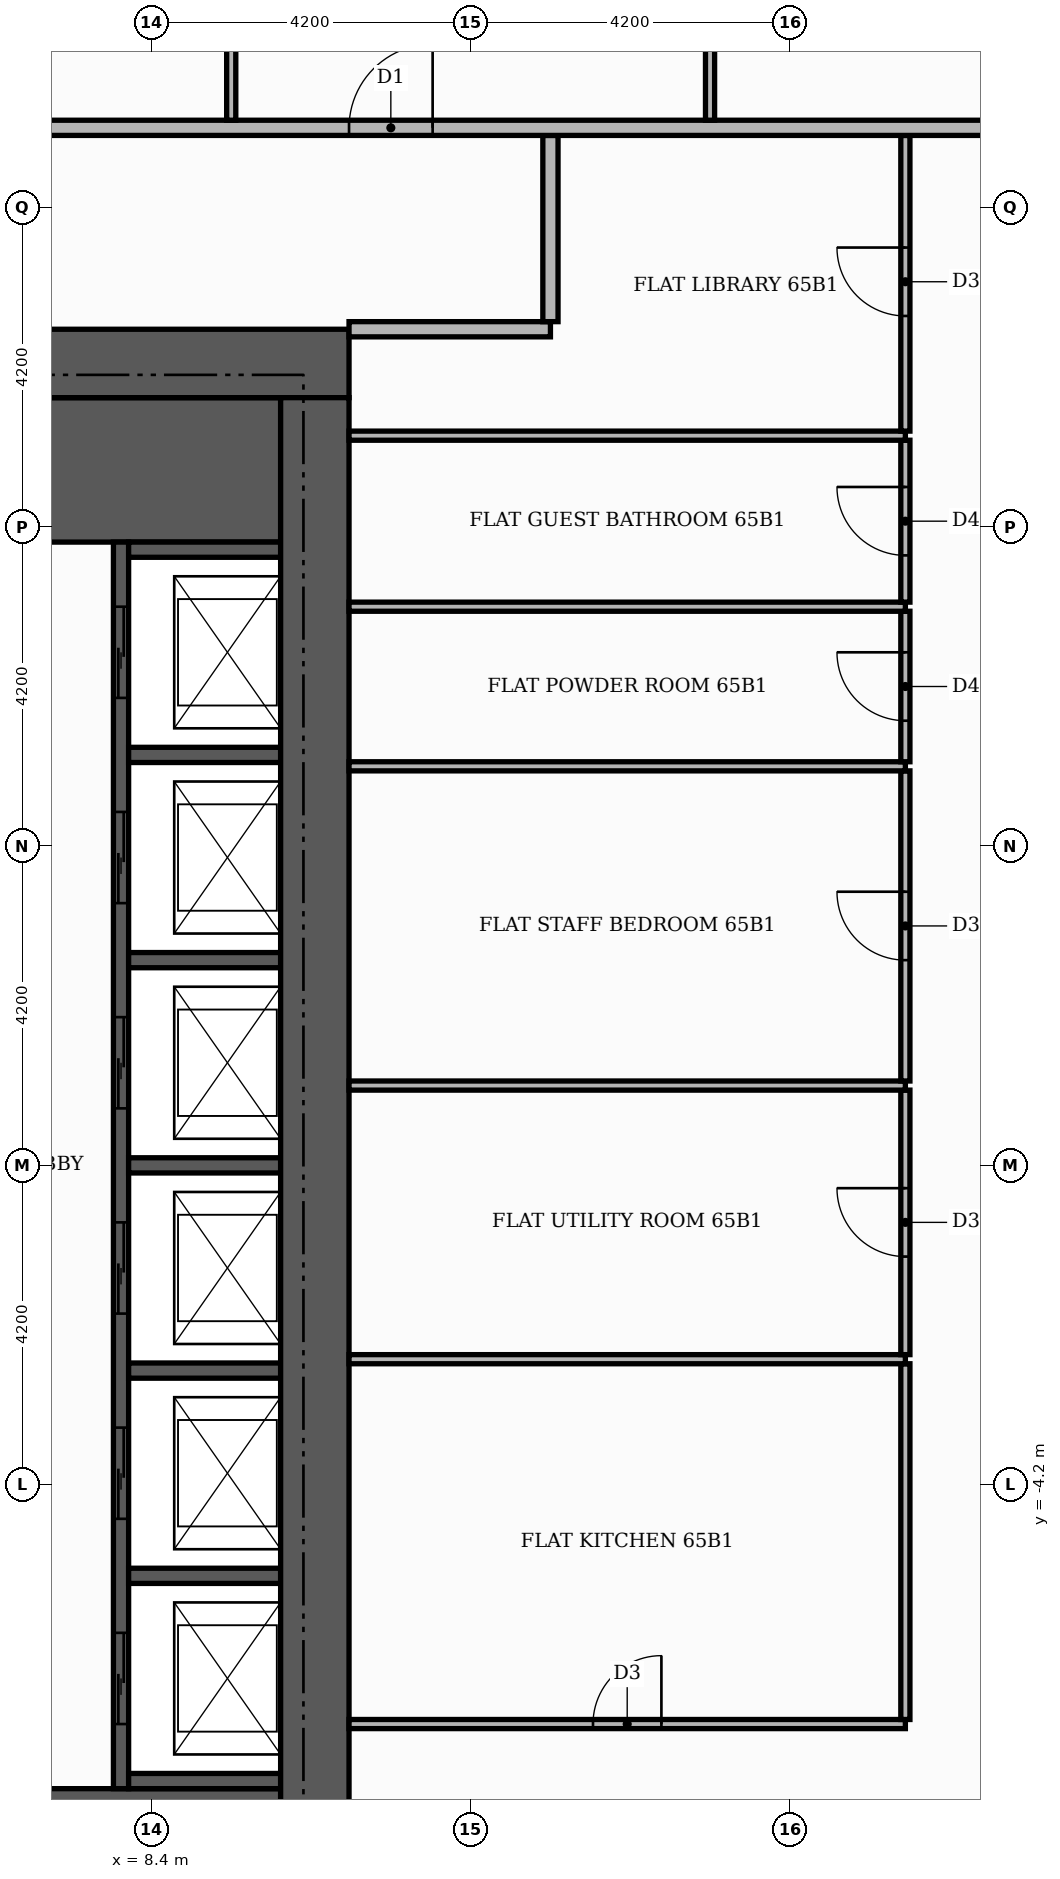
"""IFC4 building model, lengths in metres.
Left out: names, types, materials, properties, quantities, classifications, styles, units other than length and angle.
Written with IfcOpenShell. Run it as: python <this file> out.ifc"""

import sys

from ifc_helpers import new_model, si_unit, direction, frame, frame_2d, origin, place, context, subcontext, project, spatial, rectangle, extrude, element, fill, save


model = new_model("IFC4")
c1 = context("Model", 3, precision=1e-05, world=origin(), true_north=direction((0.0, 1.0)))
c2 = subcontext(c1, "Body", "Model", "MODEL_VIEW")
j1 = project(units=[si_unit("LENGTHUNIT", "METRE"), si_unit("PLANEANGLEUNIT", "RADIAN")], contexts=[c1])
p1 = place(None, origin())
s1 = spatial("IfcSite", under=j1, at=p1, CompositionType="ELEMENT")
p2 = place(p1, origin())
s2 = spatial("IfcBuilding", under=s1, at=p2, CompositionType="ELEMENT")
p3 = place(p2, frame((0.0, 0.0, 271.8)))
s3 = spatial("IfcBuildingStorey", under=s2, at=p3, CompositionType="ELEMENT", Elevation=271.8)
for number, where, z_axis, x_axis in (
    (1, (5.5, -9.15, 0.0), (0.0, 0.0, 1.0), (1.0, 0.0, 0.0)),
    (2, (5.5, 9.15, 0.0), (0.0, 0.0, 1.0), (1.0, 0.0, 0.0)),
):
    element("IfcWall", number, at=place(p3, frame(where, z_axis=z_axis, x_axis=x_axis)), inside=s3, PredefinedType="SHEAR", context=c2, shape_type="SweptSolid", body=[
        extrude(rectangle(XDim=4.6, YDim=1.9, at=frame_2d((2.3, 0.0))), origin(), (0.0, 0.0, 1.0), 3.48),
    ])
p4 = place(p3, frame((8.0, -8.2, 0.0), z_axis=(0.0, 0.0, 1.0), x_axis=(0.0, 1.0, 0.0)))
e3 = element("IfcWall", 3, at=p4, inside=s3, PredefinedType="SHEAR", context=c2, shape_type="SweptSolid", body=[
    extrude(rectangle(XDim=16.4, YDim=0.2, at=frame_2d((8.2, 0.0))), origin(), (0.0, 0.0, 1.0), 3.48),
])
p5 = place(p4, frame((0.85, 0.0, 0.0)))
e4 = element("IfcOpeningElement", 4, at=p5, cuts=e3, PredefinedType="OPENING", context=c2, shape_type="SweptSolid", body=[
    extrude(rectangle(XDim=1.2, YDim=2.1, at=frame_2d((0.6, 1.05))), frame((0.0, 0.11, 0.0), z_axis=(0.0, -1.0, 0.0), x_axis=(1.0, 0.0, 0.0)), (0.0, 0.0, 1.0), 0.22),
])
p6 = place(p4, frame((3.55, 0.0, 0.0)))
e5 = element("IfcOpeningElement", 5, at=p6, cuts=e3, PredefinedType="OPENING", context=c2, shape_type="SweptSolid", body=[
    extrude(rectangle(XDim=1.2, YDim=2.1, at=frame_2d((0.6, 1.05))), frame((0.0, 0.11, 0.0), z_axis=(0.0, -1.0, 0.0), x_axis=(1.0, 0.0, 0.0)), (0.0, 0.0, 1.0), 0.22),
])
p7 = place(p4, frame((6.25, 0.0, 0.0)))
e6 = element("IfcOpeningElement", 6, at=p7, cuts=e3, PredefinedType="OPENING", context=c2, shape_type="SweptSolid", body=[
    extrude(rectangle(XDim=1.2, YDim=2.1, at=frame_2d((0.6, 1.05))), frame((0.0, 0.11, 0.0), z_axis=(0.0, -1.0, 0.0), x_axis=(1.0, 0.0, 0.0)), (0.0, 0.0, 1.0), 0.22),
])
p8 = place(p4, frame((8.95, 0.0, 0.0)))
e7 = element("IfcOpeningElement", 7, at=p8, cuts=e3, PredefinedType="OPENING", context=c2, shape_type="SweptSolid", body=[
    extrude(rectangle(XDim=1.2, YDim=2.1, at=frame_2d((0.6, 1.05))), frame((0.0, 0.11, 0.0), z_axis=(0.0, -1.0, 0.0), x_axis=(1.0, 0.0, 0.0)), (0.0, 0.0, 1.0), 0.22),
])
p9 = place(p4, frame((11.65, 0.0, 0.0)))
e8 = element("IfcOpeningElement", 8, at=p9, cuts=e3, PredefinedType="OPENING", context=c2, shape_type="SweptSolid", body=[
    extrude(rectangle(XDim=1.2, YDim=2.1, at=frame_2d((0.6, 1.05))), frame((0.0, 0.11, 0.0), z_axis=(0.0, -1.0, 0.0), x_axis=(1.0, 0.0, 0.0)), (0.0, 0.0, 1.0), 0.22),
])
p10 = place(p4, frame((14.35, 0.0, 0.0)))
e9 = element("IfcOpeningElement", 9, at=p10, cuts=e3, PredefinedType="OPENING", context=c2, shape_type="SweptSolid", body=[
    extrude(rectangle(XDim=1.2, YDim=2.1, at=frame_2d((0.6, 1.05))), frame((0.0, 0.11, 0.0), z_axis=(0.0, -1.0, 0.0), x_axis=(1.0, 0.0, 0.0)), (0.0, 0.0, 1.0), 0.22),
])
for number, where, z_axis, x_axis in (
    (10, (8.1, -8.1, 0.0), (0.0, 0.0, 1.0), (1.0, 0.0, 0.0)),
    (11, (8.1, -5.4, 0.0), (0.0, 0.0, 1.0), (1.0, 0.0, 0.0)),
    (12, (8.1, -2.7, 0.0), (0.0, 0.0, 1.0), (1.0, 0.0, 0.0)),
    (13, (8.1, 0.0, 0.0), (0.0, 0.0, 1.0), (1.0, 0.0, 0.0)),
    (14, (8.1, 2.7, 0.0), (0.0, 0.0, 1.0), (1.0, 0.0, 0.0)),
    (15, (8.1, 5.4, 0.0), (0.0, 0.0, 1.0), (1.0, 0.0, 0.0)),
    (16, (8.1, 8.1, 0.0), (0.0, 0.0, 1.0), (1.0, 0.0, 0.0)),
):
    element("IfcWall", number, at=place(p3, frame(where, z_axis=z_axis, x_axis=x_axis)), inside=s3, PredefinedType="SHEAR", context=c2, shape_type="SweptSolid", body=[
        extrude(rectangle(XDim=2.0, YDim=0.2, at=frame_2d((1.0, 0.0))), origin(), (0.0, 0.0, 1.0), 3.48),
    ])
p11 = place(p3, frame((-11.0, 10.55, 0.0), z_axis=(0.0, 0.0, 1.0), x_axis=(1.0, 0.0, 0.0)))
e17 = element("IfcWall", 17, at=p11, inside=s3, PredefinedType="SHEAR", context=c2, shape_type="SweptSolid", body=[
    extrude(rectangle(XDim=22.0, YDim=0.9, at=frame_2d((11.0, 0.0))), origin(), (0.0, 0.0, 1.0), 3.48),
])
p12 = place(p11, frame((13.3, 0.0, 0.0)))
e18 = element("IfcOpeningElement", 18, at=p12, cuts=e17, PredefinedType="OPENING", context=c2, shape_type="SweptSolid", body=[
    extrude(rectangle(XDim=1.8, YDim=2.2, at=frame_2d((0.9, 1.1))), frame((0.0, 0.46, 0.0), z_axis=(0.0, -1.0, 0.0), x_axis=(1.0, 0.0, 0.0)), (0.0, 0.0, 1.0), 0.92),
])
p13 = place(p3, frame((10.55, -10.1, 0.0), z_axis=(0.0, 0.0, 1.0), x_axis=(0.0, 1.0, 0.0)))
e19 = element("IfcWall", 19, at=p13, inside=s3, PredefinedType="SHEAR", context=c2, shape_type="SweptSolid", body=[
    extrude(rectangle(XDim=20.2, YDim=0.9, at=frame_2d((10.1, 0.0))), origin(), (0.0, 0.0, 1.0), 3.48),
])
p14 = place(p3, frame((11.0, -7.35, 0.0), z_axis=(0.0, 0.0, 1.0), x_axis=(1.0, 0.0, 0.0)))
e20 = element("IfcWall", 20, at=p14, inside=s3, PredefinedType="PARTITIONING", context=c2, shape_type="SweptSolid", body=[
    extrude(rectangle(XDim=7.32, YDim=0.12, at=frame_2d((3.66, 0.0))), origin(), (0.0, 0.0, 1.0), 3.48),
])
p15 = place(p14, frame((3.21, 0.0, 0.0)))
e21 = element("IfcOpeningElement", 21, at=p15, cuts=e20, PredefinedType="OPENING", context=c2, shape_type="SweptSolid", body=[
    extrude(rectangle(XDim=0.9, YDim=2.1, at=frame_2d((0.45, 1.05))), frame((0.0, 0.07, 0.0), z_axis=(0.0, -1.0, 0.0), x_axis=(1.0, 0.0, 0.0)), (0.0, 0.0, 1.0), 0.14),
])
p16 = place(p3, frame((18.32, -7.29, 0.0), z_axis=(0.0, 0.0, 1.0), x_axis=(0.0, 1.0, 0.0)))
e22 = element("IfcWall", 22, at=p16, inside=s3, PredefinedType="PARTITIONING", context=c2, shape_type="SweptSolid", body=[
    extrude(rectangle(XDim=4.68, YDim=0.12, at=frame_2d((2.34, 0.0))), origin(), (0.0, 0.0, 1.0), 3.48),
])
p17 = place(p3, frame((11.0, -2.55, 0.0), z_axis=(0.0, 0.0, 1.0), x_axis=(1.0, 0.0, 0.0)))
e23 = element("IfcWall", 23, at=p17, inside=s3, PredefinedType="PARTITIONING", context=c2, shape_type="SweptSolid", body=[
    extrude(rectangle(XDim=7.32, YDim=0.12, at=frame_2d((3.66, 0.0))), origin(), (0.0, 0.0, 1.0), 3.48),
])
p18 = place(p3, frame((18.32, -2.49, 0.0), z_axis=(0.0, 0.0, 1.0), x_axis=(0.0, 1.0, 0.0)))
e24 = element("IfcWall", 24, at=p18, inside=s3, PredefinedType="PARTITIONING", context=c2, shape_type="SweptSolid", body=[
    extrude(rectangle(XDim=3.48, YDim=0.12, at=frame_2d((1.74, 0.0))), origin(), (0.0, 0.0, 1.0), 3.48),
])
p19 = place(p18, frame((1.29, 0.0, 0.0)))
e25 = element("IfcOpeningElement", 25, at=p19, cuts=e24, PredefinedType="OPENING", context=c2, shape_type="SweptSolid", body=[
    extrude(rectangle(XDim=0.9, YDim=2.1, at=frame_2d((0.45, 1.05))), frame((0.0, 0.07, 0.0), z_axis=(0.0, -1.0, 0.0), x_axis=(1.0, 0.0, 0.0)), (0.0, 0.0, 1.0), 0.14),
])
p20 = place(p3, frame((11.0, 1.05, 0.0), z_axis=(0.0, 0.0, 1.0), x_axis=(1.0, 0.0, 0.0)))
e26 = element("IfcWall", 26, at=p20, inside=s3, PredefinedType="PARTITIONING", context=c2, shape_type="SweptSolid", body=[
    extrude(rectangle(XDim=7.32, YDim=0.12, at=frame_2d((3.66, 0.0))), origin(), (0.0, 0.0, 1.0), 3.48),
])
p21 = place(p3, frame((18.32, 1.11, 0.0), z_axis=(0.0, 0.0, 1.0), x_axis=(0.0, 1.0, 0.0)))
e27 = element("IfcWall", 27, at=p21, inside=s3, PredefinedType="PARTITIONING", context=c2, shape_type="SweptSolid", body=[
    extrude(rectangle(XDim=4.08, YDim=0.12, at=frame_2d((2.04, 0.0))), origin(), (0.0, 0.0, 1.0), 3.48),
])
p22 = place(p21, frame((1.59, 0.0, 0.0)))
e28 = element("IfcOpeningElement", 28, at=p22, cuts=e27, PredefinedType="OPENING", context=c2, shape_type="SweptSolid", body=[
    extrude(rectangle(XDim=0.9, YDim=2.1, at=frame_2d((0.45, 1.05))), frame((0.0, 0.07, 0.0), z_axis=(0.0, -1.0, 0.0), x_axis=(1.0, 0.0, 0.0)), (0.0, 0.0, 1.0), 0.14),
])
p23 = place(p3, frame((11.0, 5.25, 0.0), z_axis=(0.0, 0.0, 1.0), x_axis=(1.0, 0.0, 0.0)))
e29 = element("IfcWall", 29, at=p23, inside=s3, PredefinedType="PARTITIONING", context=c2, shape_type="SweptSolid", body=[
    extrude(rectangle(XDim=7.32, YDim=0.12, at=frame_2d((3.66, 0.0))), origin(), (0.0, 0.0, 1.0), 3.48),
])
p24 = place(p3, frame((18.32, 5.31, 0.0), z_axis=(0.0, 0.0, 1.0), x_axis=(0.0, 1.0, 0.0)))
e30 = element("IfcWall", 30, at=p24, inside=s3, PredefinedType="PARTITIONING", context=c2, shape_type="SweptSolid", body=[
    extrude(rectangle(XDim=1.98, YDim=0.12, at=frame_2d((0.99, 0.0))), origin(), (0.0, 0.0, 1.0), 3.48),
])
p25 = place(p24, frame((0.54, 0.0, 0.0)))
e31 = element("IfcOpeningElement", 31, at=p25, cuts=e30, PredefinedType="OPENING", context=c2, shape_type="SweptSolid", body=[
    extrude(rectangle(XDim=0.9, YDim=2.1, at=frame_2d((0.45, 1.05))), frame((0.0, 0.07, 0.0), z_axis=(0.0, -1.0, 0.0), x_axis=(1.0, 0.0, 0.0)), (0.0, 0.0, 1.0), 0.14),
])
p26 = place(p3, frame((11.0, 7.35, 0.0), z_axis=(0.0, 0.0, 1.0), x_axis=(1.0, 0.0, 0.0)))
e32 = element("IfcWall", 32, at=p26, inside=s3, PredefinedType="PARTITIONING", context=c2, shape_type="SweptSolid", body=[
    extrude(rectangle(XDim=7.32, YDim=0.12, at=frame_2d((3.66, 0.0))), origin(), (0.0, 0.0, 1.0), 3.48),
])
p27 = place(p3, frame((18.32, 7.41, 0.0), z_axis=(0.0, 0.0, 1.0), x_axis=(0.0, 1.0, 0.0)))
e33 = element("IfcWall", 33, at=p27, inside=s3, PredefinedType="PARTITIONING", context=c2, shape_type="SweptSolid", body=[
    extrude(rectangle(XDim=2.13, YDim=0.12, at=frame_2d((1.065, 0.0))), origin(), (0.0, 0.0, 1.0), 3.48),
])
p28 = place(p27, frame((0.615, 0.0, 0.0)))
e34 = element("IfcOpeningElement", 34, at=p28, cuts=e33, PredefinedType="OPENING", context=c2, shape_type="SweptSolid", body=[
    extrude(rectangle(XDim=0.9, YDim=2.1, at=frame_2d((0.45, 1.05))), frame((0.0, 0.07, 0.0), z_axis=(0.0, -1.0, 0.0), x_axis=(1.0, 0.0, 0.0)), (0.0, 0.0, 1.0), 0.14),
])
p29 = place(p3, frame((11.0, 9.6, 0.0), z_axis=(0.0, 0.0, 1.0), x_axis=(1.0, 0.0, 0.0)))
e35 = element("IfcWall", 35, at=p29, inside=s3, PredefinedType="PARTITIONING", context=c2, shape_type="SweptSolid", body=[
    extrude(rectangle(XDim=7.32, YDim=0.12, at=frame_2d((3.66, 0.0))), origin(), (0.0, 0.0, 1.0), 3.48),
])
p30 = place(p3, frame((18.32, 9.66, 0.0), z_axis=(0.0, 0.0, 1.0), x_axis=(0.0, 1.0, 0.0)))
e36 = element("IfcWall", 36, at=p30, inside=s3, PredefinedType="PARTITIONING", context=c2, shape_type="SweptSolid", body=[
    extrude(rectangle(XDim=3.89, YDim=0.12, at=frame_2d((1.945, 0.0))), origin(), (0.0, 0.0, 1.0), 3.48),
])
p31 = place(p30, frame((1.515, 0.0, 0.0)))
e37 = element("IfcOpeningElement", 37, at=p31, cuts=e36, PredefinedType="OPENING", context=c2, shape_type="SweptSolid", body=[
    extrude(rectangle(XDim=0.9, YDim=2.1, at=frame_2d((0.45, 1.05))), frame((0.0, 0.07, 0.0), z_axis=(0.0, -1.0, 0.0), x_axis=(1.0, 0.0, 0.0)), (0.0, 0.0, 1.0), 0.14),
])
p32 = place(p3, frame((11.0, 11.0, 0.0), z_axis=(0.0, 0.0, 1.0), x_axis=(1.0, 0.0, 0.0)))
e38 = element("IfcWall", 38, at=p32, inside=s3, PredefinedType="PARTITIONING", context=c2, shape_type="SweptSolid", body=[
    extrude(rectangle(XDim=2.65, YDim=0.2, at=frame_2d((1.325, 0.0))), origin(), (0.0, 0.0, 1.0), 3.48),
])
p33 = place(p3, frame((13.65, 11.1, 0.0), z_axis=(0.0, 0.0, 1.0), x_axis=(0.0, 1.0, 0.0)))
e39 = element("IfcWall", 39, at=p33, inside=s3, PredefinedType="PARTITIONING", context=c2, shape_type="SweptSolid", body=[
    extrude(rectangle(XDim=2.45, YDim=0.2, at=frame_2d((1.225, 0.0))), origin(), (0.0, 0.0, 1.0), 3.48),
])
p34 = place(p3, frame((-13.65, 13.65, 0.0), z_axis=(0.0, 0.0, 1.0), x_axis=(1.0, 0.0, 0.0)))
e40 = element("IfcWall", 40, at=p34, inside=s3, PredefinedType="PARTITIONING", context=c2, shape_type="SweptSolid", body=[
    extrude(rectangle(XDim=39.07, YDim=0.2, at=frame_2d((19.535, 0.0))), origin(), (0.0, 0.0, 1.0), 3.48),
])
p35 = place(p34, frame((24.65, 0.0, 0.0)))
e41 = element("IfcOpeningElement", 41, at=p35, cuts=e40, PredefinedType="OPENING", context=c2, shape_type="SweptSolid", body=[
    extrude(rectangle(XDim=1.1, YDim=2.4, at=frame_2d((0.55, 1.2))), frame((0.0, 0.11, 0.0), z_axis=(0.0, -1.0, 0.0), x_axis=(1.0, 0.0, 0.0)), (0.0, 0.0, 1.0), 0.22),
])
p36 = place(p3, frame((9.45, 13.75, 0.0), z_axis=(0.0, 0.0, 1.0), x_axis=(0.0, 1.0, 0.0)))
e42 = element("IfcWall", 42, at=p36, inside=s3, PredefinedType="PARTITIONING", context=c2, shape_type="SweptSolid", body=[
    extrude(rectangle(XDim=4.81, YDim=0.12, at=frame_2d((2.405, 0.0))), origin(), (0.0, 0.0, 1.0), 3.48),
])
p37 = place(p3, frame((15.75, 13.75, 0.0), z_axis=(0.0, 0.0, 1.0), x_axis=(0.0, 1.0, 0.0)))
e43 = element("IfcWall", 43, at=p37, inside=s3, PredefinedType="PARTITIONING", context=c2, shape_type="SweptSolid", body=[
    extrude(rectangle(XDim=6.31, YDim=0.12, at=frame_2d((3.155, 0.0))), origin(), (0.0, 0.0, 1.0), 3.48),
])
p38 = place(p37, frame((2.685, 0.0, 0.0)))
e44 = element("IfcOpeningElement", 44, at=p38, cuts=e43, PredefinedType="OPENING", context=c2, shape_type="SweptSolid", body=[
    extrude(rectangle(XDim=0.9, YDim=2.1, at=frame_2d((0.45, 1.05))), frame((0.0, 0.07, 0.0), z_axis=(0.0, -1.0, 0.0), x_axis=(1.0, 0.0, 0.0)), (0.0, 0.0, 1.0), 0.14),
])
p39 = place(p5, origin())
e45 = element("IfcDoor", 45, at=p39, inside=s3, OperationType="SLIDING_TO_LEFT", PredefinedType="DOOR", context=c2, shape_type="SweptSolid", body=[
    extrude(rectangle(XDim=1.2, YDim=2.1, at=frame_2d((0.6, 1.05))), frame((0.0, 0.025, 0.0), z_axis=(0.0, -1.0, 0.0), x_axis=(1.0, 0.0, 0.0)), (0.0, 0.0, 1.0), 0.05),
])
fill(e4, e45)
p40 = place(p6, origin())
e46 = element("IfcDoor", 46, at=p40, inside=s3, OperationType="SLIDING_TO_LEFT", PredefinedType="DOOR", context=c2, shape_type="SweptSolid", body=[
    extrude(rectangle(XDim=1.2, YDim=2.1, at=frame_2d((0.6, 1.05))), frame((0.0, 0.025, 0.0), z_axis=(0.0, -1.0, 0.0), x_axis=(1.0, 0.0, 0.0)), (0.0, 0.0, 1.0), 0.05),
])
fill(e5, e46)
p41 = place(p7, origin())
e47 = element("IfcDoor", 47, at=p41, inside=s3, OperationType="SLIDING_TO_LEFT", PredefinedType="DOOR", context=c2, shape_type="SweptSolid", body=[
    extrude(rectangle(XDim=1.2, YDim=2.1, at=frame_2d((0.6, 1.05))), frame((0.0, 0.025, 0.0), z_axis=(0.0, -1.0, 0.0), x_axis=(1.0, 0.0, 0.0)), (0.0, 0.0, 1.0), 0.05),
])
fill(e6, e47)
p42 = place(p8, origin())
e48 = element("IfcDoor", 48, at=p42, inside=s3, OperationType="SLIDING_TO_LEFT", PredefinedType="DOOR", context=c2, shape_type="SweptSolid", body=[
    extrude(rectangle(XDim=1.2, YDim=2.1, at=frame_2d((0.6, 1.05))), frame((0.0, 0.025, 0.0), z_axis=(0.0, -1.0, 0.0), x_axis=(1.0, 0.0, 0.0)), (0.0, 0.0, 1.0), 0.05),
])
fill(e7, e48)
p43 = place(p9, origin())
e49 = element("IfcDoor", 49, at=p43, inside=s3, OperationType="SLIDING_TO_LEFT", PredefinedType="DOOR", context=c2, shape_type="SweptSolid", body=[
    extrude(rectangle(XDim=1.2, YDim=2.1, at=frame_2d((0.6, 1.05))), frame((0.0, 0.025, 0.0), z_axis=(0.0, -1.0, 0.0), x_axis=(1.0, 0.0, 0.0)), (0.0, 0.0, 1.0), 0.05),
])
fill(e8, e49)
p44 = place(p10, origin())
e50 = element("IfcDoor", 50, at=p44, inside=s3, OperationType="SLIDING_TO_LEFT", PredefinedType="DOOR", context=c2, shape_type="SweptSolid", body=[
    extrude(rectangle(XDim=1.2, YDim=2.1, at=frame_2d((0.6, 1.05))), frame((0.0, 0.025, 0.0), z_axis=(0.0, -1.0, 0.0), x_axis=(1.0, 0.0, 0.0)), (0.0, 0.0, 1.0), 0.05),
])
fill(e9, e50)
p45 = place(p15, origin())
e51 = element("IfcDoor", 51, at=p45, inside=s3, OperationType="SINGLE_SWING_RIGHT", PredefinedType="DOOR", context=c2, shape_type="SweptSolid", body=[
    extrude(rectangle(XDim=0.9, YDim=2.1, at=frame_2d((0.45, 1.05))), frame((0.0, 0.025, 0.0), z_axis=(0.0, -1.0, 0.0), x_axis=(1.0, 0.0, 0.0)), (0.0, 0.0, 1.0), 0.05),
])
fill(e21, e51)
p46 = place(p19, origin())
e52 = element("IfcDoor", 52, at=p46, inside=s3, OperationType="SINGLE_SWING_RIGHT", PredefinedType="DOOR", context=c2, shape_type="SweptSolid", body=[
    extrude(rectangle(XDim=0.9, YDim=2.1, at=frame_2d((0.45, 1.05))), frame((0.0, 0.025, 0.0), z_axis=(0.0, -1.0, 0.0), x_axis=(1.0, 0.0, 0.0)), (0.0, 0.0, 1.0), 0.05),
])
fill(e25, e52)
p47 = place(p22, origin())
e53 = element("IfcDoor", 53, at=p47, inside=s3, OperationType="SINGLE_SWING_RIGHT", PredefinedType="DOOR", context=c2, shape_type="SweptSolid", body=[
    extrude(rectangle(XDim=0.9, YDim=2.1, at=frame_2d((0.45, 1.05))), frame((0.0, 0.025, 0.0), z_axis=(0.0, -1.0, 0.0), x_axis=(1.0, 0.0, 0.0)), (0.0, 0.0, 1.0), 0.05),
])
fill(e28, e53)
p48 = place(p25, origin())
e54 = element("IfcDoor", 54, at=p48, inside=s3, OperationType="SINGLE_SWING_RIGHT", PredefinedType="DOOR", context=c2, shape_type="SweptSolid", body=[
    extrude(rectangle(XDim=0.9, YDim=2.1, at=frame_2d((0.45, 1.05))), frame((0.0, 0.025, 0.0), z_axis=(0.0, -1.0, 0.0), x_axis=(1.0, 0.0, 0.0)), (0.0, 0.0, 1.0), 0.05),
])
fill(e31, e54)
p49 = place(p28, origin())
e55 = element("IfcDoor", 55, at=p49, inside=s3, OperationType="SINGLE_SWING_RIGHT", PredefinedType="DOOR", context=c2, shape_type="SweptSolid", body=[
    extrude(rectangle(XDim=0.9, YDim=2.1, at=frame_2d((0.45, 1.05))), frame((0.0, 0.025, 0.0), z_axis=(0.0, -1.0, 0.0), x_axis=(1.0, 0.0, 0.0)), (0.0, 0.0, 1.0), 0.05),
])
fill(e34, e55)
p50 = place(p31, origin())
e56 = element("IfcDoor", 56, at=p50, inside=s3, OperationType="SINGLE_SWING_RIGHT", PredefinedType="DOOR", context=c2, shape_type="SweptSolid", body=[
    extrude(rectangle(XDim=0.9, YDim=2.1, at=frame_2d((0.45, 1.05))), frame((0.0, 0.025, 0.0), z_axis=(0.0, -1.0, 0.0), x_axis=(1.0, 0.0, 0.0)), (0.0, 0.0, 1.0), 0.05),
])
fill(e37, e56)
p51 = place(p35, origin())
e57 = element("IfcDoor", 57, at=p51, inside=s3, OperationType="SINGLE_SWING_RIGHT", PredefinedType="DOOR", context=c2, shape_type="SweptSolid", body=[
    extrude(rectangle(XDim=1.1, YDim=2.4, at=frame_2d((0.55, 1.2))), frame((0.0, 0.025, 0.0), z_axis=(0.0, -1.0, 0.0), x_axis=(1.0, 0.0, 0.0)), (0.0, 0.0, 1.0), 0.05),
])
fill(e41, e57)
save(model, sys.argv[1])
